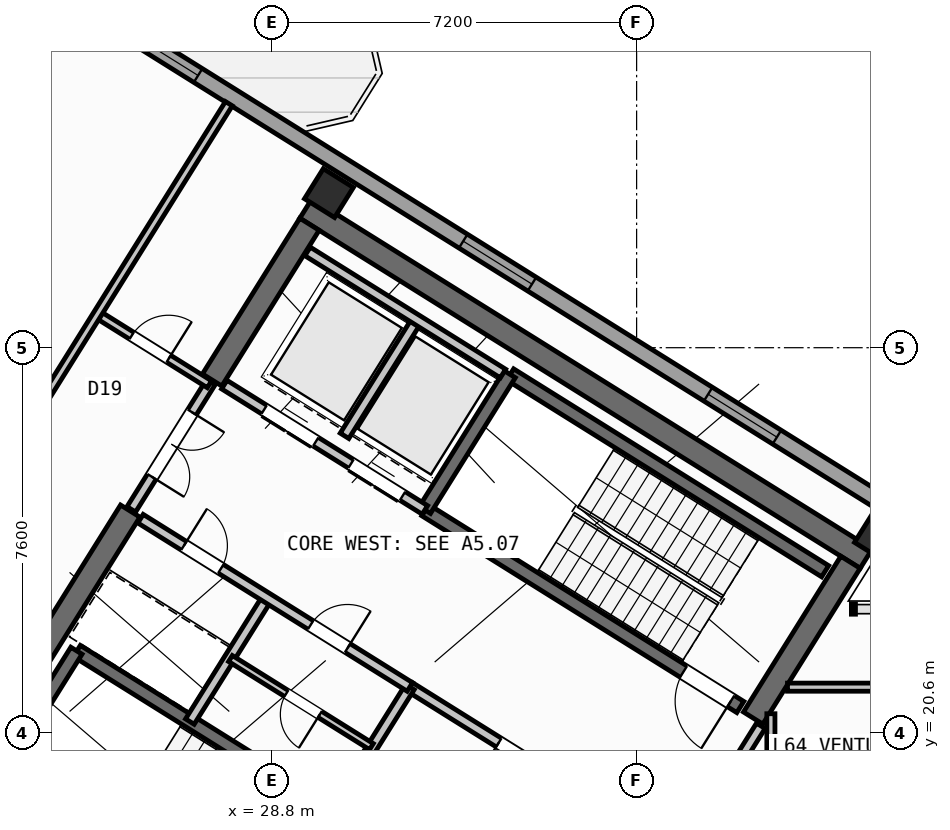
"""IFC4 building model, lengths in metres.
Left out: names, types, materials, properties, quantities, classifications, styles, units other than length and angle.
Written with IfcOpenShell. Run it as: python <this file> out.ifc"""

import sys

from ifc_helpers import new_model, si_unit, direction, frame, frame_2d, origin, origin_2d, place, context, subcontext, project, spatial, rectangle, hollow_rectangle, extrude, source, transform, mapped, element, fill, save


model = new_model("IFC4")
c1 = context("Model", 3, precision=1e-05, world=origin(), true_north=direction((0.0, 1.0)))
c2 = subcontext(c1, "Body", "Model", "MODEL_VIEW")
j1 = project(units=[si_unit("LENGTHUNIT", "METRE"), si_unit("PLANEANGLEUNIT", "RADIAN")], contexts=[c1])
p1 = place(None, origin())
s1 = spatial("IfcSite", under=j1, at=p1, CompositionType="ELEMENT")
p2 = place(p1, origin())
s2 = spatial("IfcBuilding", under=s1, at=p2, CompositionType="ELEMENT")
p3 = place(p2, frame((0.0, 0.0, 254.7)))
s3 = spatial("IfcBuildingStorey", under=s2, at=p3, CompositionType="ELEMENT", Elevation=254.7)
p4 = place(p3, frame((40.531, 24.036, 0.0), z_axis=(0.0, 0.0, 1.0), x_axis=(-0.848048787466, 0.529918157905, 0.0)))
e1 = element("IfcWall", 1, at=p4, inside=s3, PredefinedType="SHEAR", context=c2, shape_type="SweptSolid", body=[
    extrude(rectangle(XDim=13.04, YDim=0.45, at=frame_2d((6.52, 0.0))), origin(), (0.0, 0.0, 1.0), 4.25),
])
for number, where, z_axis, x_axis in (
    (2, (40.221, 23.965, 0.0), (0.0, 0.0, 1.0), (-0.53, -0.848, 0.0)),
    (3, (29.544, 30.636, 0.0), (0.0, 0.0, 1.0), (-0.53, -0.848, 0.0)),
):
    element("IfcWall", number, at=place(p3, frame(where, z_axis=z_axis, x_axis=x_axis)), inside=s3, PredefinedType="SHEAR", context=c2, shape_type="SweptSolid", body=[
        extrude(rectangle(XDim=3.625, YDim=0.45, at=frame_2d((1.812, 0.0))), origin(), (0.0, 0.0, 1.0), 4.25),
    ])
p5 = place(p3, frame((26.007, 24.976, 0.0), z_axis=(0.0, 0.0, 1.0), x_axis=(-0.529931155655, -0.848040665456, 0.0)))
e4 = element("IfcWall", 4, at=p5, inside=s3, PredefinedType="SHEAR", context=c2, shape_type="SweptSolid", body=[
    extrude(rectangle(XDim=6.475, YDim=0.45, at=frame_2d((3.238, 0.0))), origin(), (0.0, 0.0, 1.0), 4.25),
])
m1 = source(origin(), c2, "Body", "SweptSolid", [
    extrude(hollow_rectangle(XDim=0.7, YDim=0.7, WallThickness=0.028, at=origin_2d()), origin(), (0.0, 0.0, 1.0), 4.5),
])
for number, where, z_axis, x_axis in (
    (5, (40.783, 24.469, 0.0), (0.0, 0.0, 1.0), (-0.848, 0.53, 0.0)),
    (6, (29.928, 31.251, 0.0), (0.0, 0.0, 1.0), (-0.848, 0.53, 0.0)),
):
    element("IfcColumn", number, at=place(p3, frame(where, z_axis=z_axis, x_axis=x_axis)), inside=s3, PredefinedType="COLUMN", context=c2, shape_type="MappedRepresentation", body=[
        mapped(m1, transform((0.0, 0.0, 0.0), scale=1.0)),
    ])
p6 = place(p3, frame((29.268, 6.429, 0.0), z_axis=(0.0, 0.0, 1.0), x_axis=(-0.848049971435, 0.529916263149, 0.0)))
e7 = element("IfcWall", 7, at=p6, inside=s3, PredefinedType="STANDARD", context=c2, shape_type="SweptSolid", body=[
    extrude(rectangle(XDim=31.588, YDim=0.32, at=frame_2d((15.794, 0.0))), origin(), (0.0, 0.0, 1.0), 4.25),
])
p7 = place(p6, frame((22.349, 0.0, 0.0)))
e8 = element("IfcOpeningElement", 8, at=p7, cuts=e7, PredefinedType="OPENING", context=c2, shape_type="SweptSolid", body=[
    extrude(rectangle(XDim=1.2, YDim=2.15, at=frame_2d((0.6, 1.075))), frame((0.0, 0.17, 0.0), z_axis=(0.0, -1.0, 0.0), x_axis=(1.0, 0.0, 0.0)), (0.0, 0.0, 1.0), 0.34),
])
p8 = place(p6, frame((11.489, 0.0, 0.7)))
e9 = element("IfcOpeningElement", 9, at=p8, cuts=e7, PredefinedType="OPENING", context=c2, shape_type="SweptSolid", body=[
    extrude(rectangle(XDim=2.6, YDim=2.0, at=frame_2d((1.3, 1.0))), frame((0.0, 0.17, 0.0), z_axis=(0.0, -1.0, 0.0), x_axis=(1.0, 0.0, 0.0)), (0.0, 0.0, 1.0), 0.34),
])
p9 = place(p6, frame((17.881, 0.0, 0.75)))
e10 = element("IfcOpeningElement", 10, at=p9, cuts=e7, PredefinedType="OPENING", context=c2, shape_type="SweptSolid", body=[
    extrude(rectangle(XDim=2.0, YDim=1.95, at=frame_2d((1.0, 0.975))), frame((0.0, 0.17, 0.0), z_axis=(0.0, -1.0, 0.0), x_axis=(1.0, 0.0, 0.0)), (0.0, 0.0, 1.0), 0.34),
])
p10 = place(p6, frame((25.501, 0.0, 0.85)))
e11 = element("IfcOpeningElement", 11, at=p10, cuts=e7, PredefinedType="OPENING", context=c2, shape_type="SweptSolid", body=[
    extrude(rectangle(XDim=1.6, YDim=1.8, at=frame_2d((0.8, 0.9))), frame((0.0, 0.17, 0.0), z_axis=(0.0, -1.0, 0.0), x_axis=(1.0, 0.0, 0.0)), (0.0, 0.0, 1.0), 0.34),
])
p11 = place(p6, frame((28.725, 0.0, 0.85)))
e12 = element("IfcOpeningElement", 12, at=p11, cuts=e7, PredefinedType="OPENING", context=c2, shape_type="SweptSolid", body=[
    extrude(rectangle(XDim=1.6, YDim=1.8, at=frame_2d((0.8, 0.9))), frame((0.0, 0.17, 0.0), z_axis=(0.0, -1.0, 0.0), x_axis=(1.0, 0.0, 0.0)), (0.0, 0.0, 1.0), 0.34),
])
p12 = place(p3, frame((14.138, 41.825, 0.0), z_axis=(0.0, 0.0, 1.0), x_axis=(0.848046498049, -0.529921821731, 0.0)))
e13 = element("IfcWall", 13, at=p12, inside=s3, PredefinedType="STANDARD", context=c2, shape_type="SweptSolid", body=[
    extrude(rectangle(XDim=31.588, YDim=0.32, at=frame_2d((15.794, 0.0))), origin(), (0.0, 0.0, 1.0), 4.25),
])
p13 = place(p12, frame((9.946, 0.0, 0.0)))
e14 = element("IfcOpeningElement", 14, at=p13, cuts=e13, PredefinedType="OPENING", context=c2, shape_type="SweptSolid", body=[
    extrude(rectangle(XDim=1.05, YDim=2.15, at=frame_2d((0.525, 1.075))), frame((0.0, 0.17, 0.0), z_axis=(0.0, -1.0, 0.0), x_axis=(1.0, 0.0, 0.0)), (0.0, 0.0, 1.0), 0.34),
])
p14 = place(p12, frame((0.763, 0.0, 0.75)))
e15 = element("IfcOpeningElement", 15, at=p14, cuts=e13, PredefinedType="OPENING", context=c2, shape_type="SweptSolid", body=[
    extrude(rectangle(XDim=2.0, YDim=1.95, at=frame_2d((1.0, 0.975))), frame((0.0, 0.17, 0.0), z_axis=(0.0, -1.0, 0.0), x_axis=(1.0, 0.0, 0.0)), (0.0, 0.0, 1.0), 0.34),
])
p15 = place(p12, frame((13.574, 0.0, 0.75)))
e16 = element("IfcOpeningElement", 16, at=p15, cuts=e13, PredefinedType="OPENING", context=c2, shape_type="SweptSolid", body=[
    extrude(rectangle(XDim=2.0, YDim=1.95, at=frame_2d((1.0, 0.975))), frame((0.0, 0.17, 0.0), z_axis=(0.0, -1.0, 0.0), x_axis=(1.0, 0.0, 0.0)), (0.0, 0.0, 1.0), 0.34),
])
p16 = place(p12, frame((21.744, 0.0, 0.85)))
e17 = element("IfcOpeningElement", 17, at=p16, cuts=e13, PredefinedType="OPENING", context=c2, shape_type="SweptSolid", body=[
    extrude(rectangle(XDim=1.6, YDim=1.8, at=frame_2d((0.8, 0.9))), frame((0.0, 0.17, 0.0), z_axis=(0.0, -1.0, 0.0), x_axis=(1.0, 0.0, 0.0)), (0.0, 0.0, 1.0), 0.34),
])
p17 = place(p12, frame((27.444, 0.0, 0.85)))
e18 = element("IfcOpeningElement", 18, at=p17, cuts=e13, PredefinedType="OPENING", context=c2, shape_type="SweptSolid", body=[
    extrude(rectangle(XDim=1.6, YDim=1.8, at=frame_2d((0.8, 0.9))), frame((0.0, 0.17, 0.0), z_axis=(0.0, -1.0, 0.0), x_axis=(1.0, 0.0, 0.0)), (0.0, 0.0, 1.0), 0.34),
])
p18 = place(p3, frame((31.28, 18.261, 0.0), z_axis=(0.0, 0.0, 1.0), x_axis=(-0.848051618787, 0.529913626805, 0.0)))
e19 = element("IfcWall", 19, at=p18, inside=s3, PredefinedType="SHEAR", context=c2, shape_type="SweptSolid", body=[
    extrude(rectangle(XDim=7.46, YDim=0.26, at=frame_2d((3.73, 0.0))), origin(), (0.0, 0.0, 1.0), 4.25),
])
p19 = place(p18, frame((0.36, 0.0, 0.0)))
e20 = element("IfcOpeningElement", 20, at=p19, cuts=e19, PredefinedType="OPENING", context=c2, shape_type="SweptSolid", body=[
    extrude(rectangle(XDim=0.86, YDim=2.05, at=frame_2d((0.43, 1.025))), frame((0.0, 0.14, 0.0), z_axis=(0.0, -1.0, 0.0), x_axis=(1.0, 0.0, 0.0)), (0.0, 0.0, 1.0), 0.28),
])
p20 = place(p3, frame((24.945, 22.22, 0.0), z_axis=(0.0, 0.0, 1.0), x_axis=(-0.529908658664, -0.84805472316, 0.0)))
e21 = element("IfcWall", 21, at=p20, inside=s3, PredefinedType="SHEAR", context=c2, shape_type="SweptSolid", body=[
    extrude(rectangle(XDim=3.16, YDim=0.26, at=frame_2d((1.58, 0.0))), origin(), (0.0, 0.0, 1.0), 4.25),
])
p21 = place(p3, frame((39.721, 23.788, 0.0), z_axis=(0.0, 0.0, 1.0), x_axis=(-0.848054434086, 0.529909121291, 0.0)))
e22 = element("IfcWall", 22, at=p21, inside=s3, PredefinedType="SHEAR", context=c2, shape_type="SweptSolid", body=[
    extrude(rectangle(XDim=7.33, YDim=0.26, at=frame_2d((3.665, 0.0))), origin(), (0.0, 0.0, 1.0), 4.25),
])
p22 = place(p3, frame((38.046, 21.108, 0.0), z_axis=(0.0, 0.0, 1.0), x_axis=(-0.848054434086, 0.529909121291, 0.0)))
e23 = element("IfcWall", 23, at=p22, inside=s3, PredefinedType="SHEAR", context=c2, shape_type="SweptSolid", body=[
    extrude(rectangle(XDim=7.33, YDim=0.26, at=frame_2d((3.665, 0.0))), origin(), (0.0, 0.0, 1.0), 4.25),
])
p23 = place(p22, frame((0.22, 0.0, 0.0)))
e24 = element("IfcOpeningElement", 24, at=p23, cuts=e23, PredefinedType="OPENING", context=c2, shape_type="SweptSolid", body=[
    extrude(rectangle(XDim=1.1, YDim=2.1, at=frame_2d((0.55, 1.05))), frame((0.0, 0.14, 0.0), z_axis=(0.0, -1.0, 0.0), x_axis=(1.0, 0.0, 0.0)), (0.0, 0.0, 1.0), 0.28),
])
p24 = place(p3, frame((33.496, 27.677, 0.0), z_axis=(0.0, 0.0, 1.0), x_axis=(-0.529908658664, -0.84805472316, 0.0)))
e25 = element("IfcWall", 25, at=p24, inside=s3, PredefinedType="SHEAR", context=c2, shape_type="SweptSolid", body=[
    extrude(rectangle(XDim=3.16, YDim=0.26, at=frame_2d((1.58, 0.0))), origin(), (0.0, 0.0, 1.0), 4.25),
])
p25 = place(p3, frame((36.459, 18.421, 0.0), z_axis=(0.0, 0.0, 1.0), x_axis=(-0.848059591691, 0.529900867089, 0.0)))
e26 = element("IfcWall", 26, at=p25, inside=s3, PredefinedType="STANDARD", context=c2, shape_type="SweptSolid", body=[
    extrude(rectangle(XDim=5.818, YDim=0.2, at=frame_2d((2.909, 0.0))), origin(), (0.0, 0.0, 1.0), 4.24),
])
p26 = place(p25, frame((2.598, 0.0, 0.0)))
e27 = element("IfcOpeningElement", 27, at=p26, cuts=e26, PredefinedType="OPENING", context=c2, shape_type="SweptSolid", body=[
    extrude(rectangle(XDim=1.15, YDim=2.1, at=frame_2d((0.575, 1.05))), frame((0.0, 0.11, 0.0), z_axis=(0.0, -1.0, 0.0), x_axis=(1.0, 0.0, 0.0)), (0.0, 0.0, 1.0), 0.22),
])
p27 = place(p3, frame((31.822, 24.998, 0.0), z_axis=(0.0, 0.0, 1.0), x_axis=(-0.848054125777, 0.529909614701, 0.0)))
e28 = element("IfcWall", 28, at=p27, inside=s3, PredefinedType="STANDARD", context=c2, shape_type="SweptSolid", body=[
    extrude(rectangle(XDim=4.668, YDim=0.2, at=frame_2d((2.334, 0.0))), origin(), (0.0, 0.0, 1.0), 4.24),
])
p28 = place(p27, frame((0.52, 0.0, 0.0)))
e29 = element("IfcOpeningElement", 29, at=p28, cuts=e28, PredefinedType="OPENING", context=c2, shape_type="SweptSolid", body=[
    extrude(rectangle(XDim=1.2, YDim=2.15, at=frame_2d((0.6, 1.075))), frame((0.0, 0.11, 0.0), z_axis=(0.0, -1.0, 0.0), x_axis=(1.0, 0.0, 0.0)), (0.0, 0.0, 1.0), 0.22),
])
p29 = place(p27, frame((2.54, 0.0, 0.0)))
e30 = element("IfcOpeningElement", 30, at=p29, cuts=e28, PredefinedType="OPENING", context=c2, shape_type="SweptSolid", body=[
    extrude(rectangle(XDim=1.2, YDim=2.15, at=frame_2d((0.6, 1.075))), frame((0.0, 0.11, 0.0), z_axis=(0.0, -1.0, 0.0), x_axis=(1.0, 0.0, 0.0)), (0.0, 0.0, 1.0), 0.22),
])
p30 = place(p3, frame((31.645, 28.716, 0.0), z_axis=(0.0, 0.0, 1.0), x_axis=(-0.52986693015, -0.848080795876, 0.0)))
e31 = element("IfcWall", 31, at=p30, inside=s3, PredefinedType="STANDARD", context=c2, shape_type="SweptSolid", body=[
    extrude(rectangle(XDim=2.66, YDim=0.2, at=frame_2d((1.33, 0.0))), origin(), (0.0, 0.0, 1.0), 4.24),
])
p31 = place(p3, frame((33.363, 27.69, 0.0), z_axis=(0.0, 0.0, 1.0), x_axis=(-0.84804957148, 0.529916903215, 0.0)))
e32 = element("IfcWall", 32, at=p31, inside=s3, PredefinedType="STANDARD", context=c2, shape_type="SweptSolid", body=[
    extrude(rectangle(XDim=4.548, YDim=0.2, at=frame_2d((2.274, 0.0))), origin(), (0.0, 0.0, 1.0), 4.24),
])
for number, where, z_axis, x_axis in (
    (33, (31.525, 21.504, 0.0), (0.0, 0.0, 1.0), (-0.53, -0.848, 0.0)),
    (34, (28.71, 23.263, 0.0), (0.0, 0.0, 1.0), (-0.53, -0.848, 0.0)),
):
    element("IfcWall", number, at=place(p3, frame(where, z_axis=z_axis, x_axis=x_axis)), inside=s3, PredefinedType="STANDARD", context=c2, shape_type="SweptSolid", body=[
        extrude(rectangle(XDim=2.88, YDim=0.2, at=frame_2d((1.44, 0.0))), origin(), (0.0, 0.0, 1.0), 4.24),
    ])
p32 = place(p3, frame((31.525, 21.504, 0.0), z_axis=(0.0, 0.0, 1.0), x_axis=(-0.848042066329, 0.529928913853, 0.0)))
e35 = element("IfcWall", 35, at=p32, inside=s3, PredefinedType="STANDARD", context=c2, shape_type="SweptSolid", body=[
    extrude(rectangle(XDim=6.268, YDim=0.2, at=frame_2d((3.134, 0.0))), origin(), (0.0, 0.0, 1.0), 4.24),
])
p33 = place(p32, frame((4.4, 0.0, 0.0)))
e36 = element("IfcOpeningElement", 36, at=p33, cuts=e35, PredefinedType="OPENING", context=c2, shape_type="SweptSolid", body=[
    extrude(rectangle(XDim=0.86, YDim=2.05, at=frame_2d((0.43, 1.025))), frame((0.0, 0.11, 0.0), z_axis=(0.0, -1.0, 0.0), x_axis=(1.0, 0.0, 0.0)), (0.0, 0.0, 1.0), 0.22),
])
p34 = place(p32, frame((1.45, 0.0, 0.0)))
e37 = element("IfcOpeningElement", 37, at=p34, cuts=e35, PredefinedType="OPENING", context=c2, shape_type="SweptSolid", body=[
    extrude(rectangle(XDim=0.86, YDim=2.05, at=frame_2d((0.43, 1.025))), frame((0.0, 0.11, 0.0), z_axis=(0.0, -1.0, 0.0), x_axis=(1.0, 0.0, 0.0)), (0.0, 0.0, 1.0), 0.22),
])
p35 = place(p3, frame((30.766, 20.327, 0.0), z_axis=(0.0, 0.0, 1.0), x_axis=(-0.848052663127, 0.529911955482, 0.0)))
e38 = element("IfcWall", 38, at=p35, inside=s3, PredefinedType="PLUMBINGWALL", context=c2, shape_type="SweptSolid", body=[
    extrude(rectangle(XDim=3.28, YDim=0.14, at=frame_2d((1.64, 0.0))), origin(), (0.0, 0.0, 1.0), 4.24),
])
p36 = place(p35, frame((1.2, 0.0, 0.0)))
e39 = element("IfcOpeningElement", 39, at=p36, cuts=e38, PredefinedType="OPENING", context=c2, shape_type="SweptSolid", body=[
    extrude(rectangle(XDim=0.78, YDim=2.05, at=frame_2d((0.39, 1.025))), frame((0.0, 0.08, 0.0), z_axis=(0.0, -1.0, 0.0), x_axis=(1.0, 0.0, 0.0)), (0.0, 0.0, 1.0), 0.16),
])
p37 = place(p3, frame((27.596, 27.52, 0.0), z_axis=(0.0, 0.0, 1.0), x_axis=(-0.529865479138, -0.848081702443, 0.0)))
e40 = element("IfcWall", 40, at=p37, inside=s3, PredefinedType="STANDARD", context=c2, shape_type="SweptSolid", body=[
    extrude(rectangle(XDim=2.96, YDim=0.2, at=frame_2d((1.48, 0.0))), origin(), (0.0, 0.0, 1.0), 4.24),
])
p38 = place(p37, frame((0.7, 0.0, 0.0)))
e41 = element("IfcOpeningElement", 41, at=p38, cuts=e40, PredefinedType="OPENING", context=c2, shape_type="SweptSolid", body=[
    extrude(rectangle(XDim=1.5, YDim=2.15, at=frame_2d((0.75, 1.075))), frame((0.0, 0.11, 0.0), z_axis=(0.0, -1.0, 0.0), x_axis=(1.0, 0.0, 0.0)), (0.0, 0.0, 1.0), 0.22),
])
p39 = place(p3, frame((27.57, 27.478, 0.0), z_axis=(0.0, 0.0, 1.0), x_axis=(-0.848050851465, 0.529914854792, 0.0)))
e42 = element("IfcWall", 42, at=p39, inside=s3, PredefinedType="PARTITIONING", context=c2, shape_type="SweptSolid", body=[
    extrude(rectangle(XDim=2.61, YDim=0.16, at=frame_2d((1.305, 0.0))), origin(), (0.0, 0.0, 1.0), 4.24),
])
p40 = place(p39, frame((0.95, 0.0, 0.0)))
e43 = element("IfcOpeningElement", 43, at=p40, cuts=e42, PredefinedType="OPENING", context=c2, shape_type="SweptSolid", body=[
    extrude(rectangle(XDim=0.86, YDim=2.05, at=frame_2d((0.43, 1.025))), frame((0.0, 0.09, 0.0), z_axis=(0.0, -1.0, 0.0), x_axis=(1.0, 0.0, 0.0)), (0.0, 0.0, 1.0), 0.18),
])
p41 = place(p3, frame((27.953, 33.016, 0.0), z_axis=(0.0, 0.0, 1.0), x_axis=(-0.529905022231, -0.848056995381, 0.0)))
e44 = element("IfcWall", 44, at=p41, inside=s3, PredefinedType="PARTITIONING", context=c2, shape_type="SweptSolid", body=[
    extrude(rectangle(XDim=11.45, YDim=0.16, at=frame_2d((5.725, 0.0))), origin(), (0.0, 0.0, 1.0), 4.24),
])
p42 = place(p3, frame((38.451, 20.737, 0.0), z_axis=(0.0, 0.0, 1.0), x_axis=(-0.529924799939, -0.848044637038, 0.0)))
e45 = element("IfcWall", 45, at=p42, inside=s3, PredefinedType="STANDARD", context=c2, shape_type="SweptSolid", body=[
    extrude(rectangle(XDim=2.96, YDim=0.2, at=frame_2d((1.48, 0.0))), origin(), (0.0, 0.0, 1.0), 4.24),
])
p43 = place(p42, frame((1.46, 0.0, 0.0)))
e46 = element("IfcOpeningElement", 46, at=p43, cuts=e45, PredefinedType="OPENING", context=c2, shape_type="SweptSolid", body=[
    extrude(rectangle(XDim=0.86, YDim=2.05, at=frame_2d((0.43, 1.025))), frame((0.0, 0.11, 0.0), z_axis=(0.0, -1.0, 0.0), x_axis=(1.0, 0.0, 0.0)), (0.0, 0.0, 1.0), 0.22),
])
p44 = place(p3, frame((38.65, 17.93, 0.0), z_axis=(0.0, 0.0, 1.0), x_axis=(0.0, 1.0, 0.0)))
e47 = element("IfcWall", 47, at=p44, inside=s3, PredefinedType="PARTITIONING", context=c2, shape_type="SweptSolid", body=[
    extrude(rectangle(XDim=3.046, YDim=0.16, at=frame_2d((1.523, 0.0))), origin(), (0.0, 0.0, 1.0), 4.24),
])
p45 = place(p3, frame((38.978, 21.5, 0.0), z_axis=(0.0, 0.0, 1.0), x_axis=(1.0, 0.0, 0.0)))
e48 = element("IfcWall", 48, at=p45, inside=s3, PredefinedType="PARTITIONING", context=c2, shape_type="SweptSolid", body=[
    extrude(rectangle(XDim=7.336, YDim=0.16, at=frame_2d((3.668, 0.0))), origin(), (0.0, 0.0, 1.0), 4.24),
])
m2 = source(origin(), c2, "Body", "SweptSolid", [
    extrude(rectangle(XDim=2.0, YDim=1.95, at=frame_2d((1.0, 0.975))), frame((0.0, 0.03, 0.0), z_axis=(0.0, -1.0, 0.0), x_axis=(1.0, 0.0, 0.0)), (0.0, 0.0, 1.0), 0.06),
])
p46 = place(p15, origin())
e49 = element("IfcWindow", 49, at=p46, inside=s3, PartitioningType="SINGLE_PANEL", PredefinedType="WINDOW", context=c2, shape_type="MappedRepresentation", body=[
    mapped(m2, transform((0.0, 0.0, 0.0), scale=1.0)),
])
fill(e16, e49)
m3 = source(origin(), c2, "Body", "SweptSolid", [
    extrude(rectangle(XDim=1.6, YDim=1.8, at=frame_2d((0.8, 0.9))), frame((0.0, 0.03, 0.0), z_axis=(0.0, -1.0, 0.0), x_axis=(1.0, 0.0, 0.0)), (0.0, 0.0, 1.0), 0.06),
])
p47 = place(p16, origin())
e50 = element("IfcWindow", 50, at=p47, inside=s3, PartitioningType="SINGLE_PANEL", PredefinedType="WINDOW", context=c2, shape_type="MappedRepresentation", body=[
    mapped(m3, transform((0.0, 0.0, 0.0), scale=1.0)),
])
fill(e17, e50)
p48 = place(p17, origin())
e51 = element("IfcWindow", 51, at=p48, inside=s3, PartitioningType="SINGLE_PANEL", PredefinedType="WINDOW", context=c2, shape_type="MappedRepresentation", body=[
    mapped(m3, transform((0.0, 0.0, 0.0), scale=1.0)),
])
fill(e18, e51)
m4 = source(origin(), c2, "Body", "SweptSolid", [
    extrude(rectangle(XDim=1.1, YDim=2.1, at=frame_2d((0.55, 1.05))), frame((0.0, 0.025, 0.0), z_axis=(0.0, -1.0, 0.0), x_axis=(1.0, 0.0, 0.0)), (0.0, 0.0, 1.0), 0.05),
])
p49 = place(p23, origin())
e52 = element("IfcDoor", 52, at=p49, inside=s3, OperationType="SINGLE_SWING_LEFT", PredefinedType="DOOR", context=c2, shape_type="MappedRepresentation", body=[
    mapped(m4, transform((0.0, 0.0, 0.0), scale=1.0)),
])
fill(e24, e52)
m5 = source(origin(), c2, "Body", "SweptSolid", [
    extrude(rectangle(XDim=1.15, YDim=2.1, at=frame_2d((0.575, 1.05))), frame((0.0, 0.025, 0.0), z_axis=(0.0, -1.0, 0.0), x_axis=(1.0, 0.0, 0.0)), (0.0, 0.0, 1.0), 0.05),
])
p50 = place(p26, origin())
e53 = element("IfcDoor", 53, at=p50, inside=s3, OperationType="SINGLE_SWING_RIGHT", PredefinedType="DOOR", context=c2, shape_type="MappedRepresentation", body=[
    mapped(m5, transform((0.0, 0.0, 0.0), scale=1.0)),
])
fill(e27, e53)
m6 = source(origin(), c2, "Body", "SweptSolid", [
    extrude(rectangle(XDim=1.2, YDim=2.15, at=frame_2d((0.6, 1.075))), frame((0.0, 0.025, 0.0), z_axis=(0.0, -1.0, 0.0), x_axis=(1.0, 0.0, 0.0)), (0.0, 0.0, 1.0), 0.05),
])
p51 = place(p28, origin())
e54 = element("IfcDoor", 54, at=p51, inside=s3, OperationType="DOUBLE_DOOR_SLIDING", PredefinedType="DOOR", context=c2, shape_type="MappedRepresentation", body=[
    mapped(m6, transform((0.0, 0.0, 0.0), scale=1.0)),
])
fill(e29, e54)
p52 = place(p29, origin())
e55 = element("IfcDoor", 55, at=p52, inside=s3, OperationType="DOUBLE_DOOR_SLIDING", PredefinedType="DOOR", context=c2, shape_type="MappedRepresentation", body=[
    mapped(m6, transform((0.0, 0.0, 0.0), scale=1.0)),
])
fill(e30, e55)
m7 = source(origin(), c2, "Body", "SweptSolid", [
    extrude(rectangle(XDim=0.86, YDim=2.05, at=frame_2d((0.43, 1.025))), frame((0.0, 0.025, 0.0), z_axis=(0.0, -1.0, 0.0), x_axis=(1.0, 0.0, 0.0)), (0.0, 0.0, 1.0), 0.05),
])
p53 = place(p33, frame((0.86, 0.0, 0.0), z_axis=(0.0, 0.0, 1.0), x_axis=(-1.0, 0.0, 0.0)))
e56 = element("IfcDoor", 56, at=p53, inside=s3, OperationType="SINGLE_SWING_LEFT", PredefinedType="DOOR", context=c2, shape_type="MappedRepresentation", body=[
    mapped(m7, transform((0.0, 0.0, 0.0), scale=1.0)),
])
fill(e36, e56)
p54 = place(p34, frame((0.86, 0.0, 0.0), z_axis=(0.0, 0.0, 1.0), x_axis=(-1.0, 0.0, 0.0)))
e57 = element("IfcDoor", 57, at=p54, inside=s3, OperationType="SINGLE_SWING_RIGHT", PredefinedType="DOOR", context=c2, shape_type="MappedRepresentation", body=[
    mapped(m7, transform((0.0, 0.0, 0.0), scale=1.0)),
])
fill(e37, e57)
m8 = source(origin(), c2, "Body", "SweptSolid", [
    extrude(rectangle(XDim=0.78, YDim=2.05, at=frame_2d((0.39, 1.025))), frame((0.0, 0.025, 0.0), z_axis=(0.0, -1.0, 0.0), x_axis=(1.0, 0.0, 0.0)), (0.0, 0.0, 1.0), 0.05),
])
p55 = place(p36, origin())
e58 = element("IfcDoor", 58, at=p55, inside=s3, OperationType="SINGLE_SWING_LEFT", PredefinedType="DOOR", context=c2, shape_type="MappedRepresentation", body=[
    mapped(m8, transform((0.0, 0.0, 0.0), scale=1.0)),
])
fill(e39, e58)
p56 = place(p40, frame((0.86, 0.0, 0.0), z_axis=(0.0, 0.0, 1.0), x_axis=(-1.0, 0.0, 0.0)))
e59 = element("IfcDoor", 59, at=p56, inside=s3, OperationType="SINGLE_SWING_RIGHT", PredefinedType="DOOR", context=c2, shape_type="MappedRepresentation", body=[
    mapped(m7, transform((0.0, 0.0, 0.0), scale=1.0)),
])
fill(e43, e59)
m9 = source(origin(), c2, "Body", "SweptSolid", [
    extrude(rectangle(XDim=1.5, YDim=2.15, at=frame_2d((0.75, 1.075))), frame((0.0, 0.025, 0.0), z_axis=(0.0, -1.0, 0.0), x_axis=(1.0, 0.0, 0.0)), (0.0, 0.0, 1.0), 0.05),
])
p57 = place(p38, origin())
e60 = element("IfcDoor", 60, at=p57, inside=s3, OperationType="DOUBLE_DOOR_SINGLE_SWING", PredefinedType="DOOR", context=c2, shape_type="MappedRepresentation", body=[
    mapped(m9, transform((0.0, 0.0, 0.0), scale=1.0)),
])
fill(e41, e60)
save(model, sys.argv[1])
